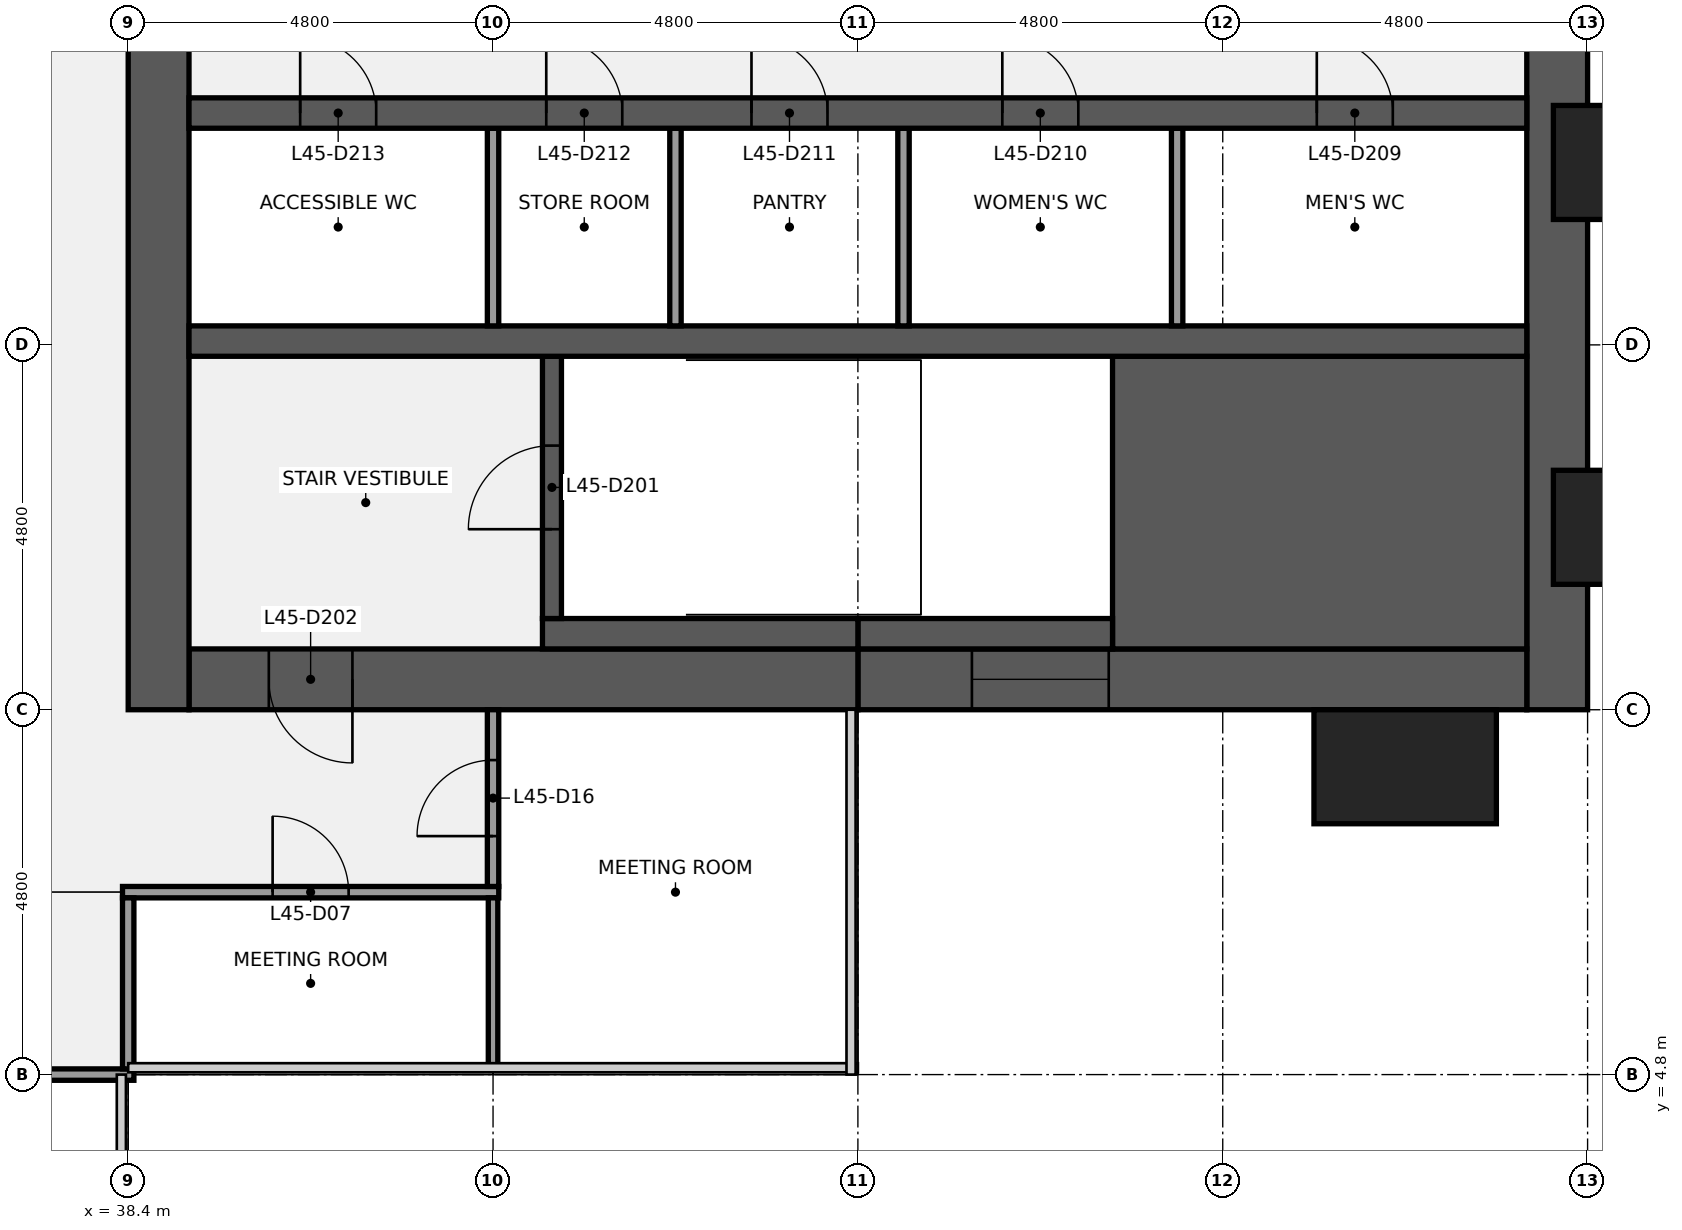
"""IFC4 building model, lengths in metres.
Left out: names, types, materials, properties, quantities, classifications, styles, units other than length and angle.
Written with IfcOpenShell. Run it as: python <this file> out.ifc"""

import sys

from ifc_helpers import new_model, si_unit, direction, frame, frame_2d, origin, origin_2d, place, context, subcontext, project, spatial, rectangle, extrude, element, fill, save


model = new_model("IFC4")
c1 = context("Model", 3, precision=1e-05, world=origin(), true_north=direction((0.0, 1.0)))
c2 = subcontext(c1, "Body", "Model", "MODEL_VIEW")
j1 = project(units=[si_unit("LENGTHUNIT", "METRE"), si_unit("PLANEANGLEUNIT", "RADIAN")], contexts=[c1])
p1 = place(None, origin())
s1 = spatial("IfcSite", under=j1, at=p1, CompositionType="ELEMENT")
p2 = place(p1, origin())
s2 = spatial("IfcBuilding", under=s1, at=p2, CompositionType="ELEMENT")
p3 = place(p2, frame((0.0, 0.0, 209.2)))
s3 = spatial("IfcBuildingStorey", under=s2, at=p3, CompositionType="ELEMENT", Elevation=209.2)
p4 = place(p3, frame((57.2, 38.4, 0.0), z_axis=(0.0, 0.0, 1.0), x_axis=(0.0, -1.0, 0.0)))
e1 = element("IfcWall", 1, at=p4, inside=s3, PredefinedType="SHEAR", context=c2, shape_type="SweptSolid", body=[
    extrude(rectangle(XDim=28.8, YDim=0.8, at=frame_2d((14.4, 0.0))), origin(), (0.0, 0.0, 1.0), 3.84),
])
p5 = place(p4, frame((18.45, 0.0, 0.9)))
e2 = element("IfcOpeningElement", 2, at=p5, cuts=e1, PredefinedType="OPENING", context=c2, shape_type="SweptSolid", body=[
    extrude(rectangle(XDim=1.5, YDim=1.5, at=frame_2d((0.75, 0.75))), frame((0.0, 0.41, 0.0), z_axis=(0.0, -1.0, 0.0), x_axis=(1.0, 0.0, 0.0)), (0.0, 0.0, 1.0), 0.82),
])
p6 = place(p4, frame((8.85, 0.0, 0.9)))
e3 = element("IfcOpeningElement", 3, at=p6, cuts=e1, PredefinedType="OPENING", context=c2, shape_type="SweptSolid", body=[
    extrude(rectangle(XDim=1.5, YDim=1.5, at=frame_2d((0.75, 0.75))), frame((0.0, 0.41, 0.0), z_axis=(0.0, -1.0, 0.0), x_axis=(1.0, 0.0, 0.0)), (0.0, 0.0, 1.0), 0.82),
])
p7 = place(p3, frame((56.8, 10.0, 0.0), z_axis=(0.0, 0.0, 1.0), x_axis=(-1.0, 0.0, 0.0)))
e4 = element("IfcWall", 4, at=p7, inside=s3, PredefinedType="SHEAR", context=c2, shape_type="SweptSolid", body=[
    extrude(rectangle(XDim=8.8, YDim=0.8, at=frame_2d((4.4, 0.0))), origin(), (0.0, 0.0, 1.0), 3.84),
])
p8 = place(p7, frame((5.5, 0.0, 0.9)))
e5 = element("IfcOpeningElement", 5, at=p8, cuts=e4, PredefinedType="OPENING", context=c2, shape_type="SweptSolid", body=[
    extrude(rectangle(XDim=1.8, YDim=1.5, at=frame_2d((0.9, 0.75))), frame((0.0, 0.41, 0.0), z_axis=(0.0, -1.0, 0.0), x_axis=(1.0, 0.0, 0.0)), (0.0, 0.0, 1.0), 0.82),
])
p9 = place(p3, frame((48.0, 10.0, 0.0), z_axis=(0.0, 0.0, 1.0), x_axis=(-1.0, 0.0, 0.0)))
e6 = element("IfcWall", 6, at=p9, inside=s3, PredefinedType="SHEAR", context=c2, shape_type="SweptSolid", body=[
    extrude(rectangle(XDim=8.8, YDim=0.8, at=frame_2d((4.4, 0.0))), origin(), (0.0, 0.0, 1.0), 3.84),
])
p10 = place(p9, frame((6.65, 0.0, 0.0)))
e7 = element("IfcOpeningElement", 7, at=p10, cuts=e6, PredefinedType="OPENING", context=c2, shape_type="SweptSolid", body=[
    extrude(rectangle(XDim=1.1, YDim=2.1, at=frame_2d((0.55, 1.05))), frame((0.0, 0.41, 0.0), z_axis=(0.0, -1.0, 0.0), x_axis=(1.0, 0.0, 0.0)), (0.0, 0.0, 1.0), 0.82),
])
p11 = place(p3, frame((38.8, 9.6, 0.0), z_axis=(0.0, 0.0, 1.0), x_axis=(0.0, 1.0, 0.0)))
e8 = element("IfcWall", 8, at=p11, inside=s3, PredefinedType="SHEAR", context=c2, shape_type="SweptSolid", body=[
    extrude(rectangle(XDim=28.8, YDim=0.8, at=frame_2d((14.4, 0.0))), origin(), (0.0, 0.0, 1.0), 3.84),
])
p12 = place(p11, frame((8.7, 0.0, 0.0)))
e9 = element("IfcOpeningElement", 9, at=p12, cuts=e8, PredefinedType="OPENING", context=c2, shape_type="SweptSolid", body=[
    extrude(rectangle(XDim=1.8, YDim=2.1, at=frame_2d((0.9, 1.05))), frame((0.0, 0.41, 0.0), z_axis=(0.0, -1.0, 0.0), x_axis=(1.0, 0.0, 0.0)), (0.0, 0.0, 1.0), 0.82),
])
p13 = place(p11, frame((18.3, 0.0, 0.0)))
e10 = element("IfcOpeningElement", 10, at=p13, cuts=e8, PredefinedType="OPENING", context=c2, shape_type="SweptSolid", body=[
    extrude(rectangle(XDim=1.8, YDim=2.1, at=frame_2d((0.9, 1.05))), frame((0.0, 0.41, 0.0), z_axis=(0.0, -1.0, 0.0), x_axis=(1.0, 0.0, 0.0)), (0.0, 0.0, 1.0), 0.82),
])
p14 = place(p3, frame((51.35, 12.325, 0.0), z_axis=(0.0, 0.0, 1.0), x_axis=(1.0, 0.0, 0.0)))
e11 = element("IfcWall", 11, at=p14, inside=s3, PredefinedType="SHEAR", context=c2, shape_type="SweptSolid", body=[
    extrude(rectangle(XDim=5.45, YDim=3.85, at=frame_2d((2.725, 0.0))), origin(), (0.0, 0.0, 1.0), 3.84),
])
p15 = place(p3, frame((48.0, 10.6, 0.0), z_axis=(0.0, 0.0, 1.0), x_axis=(1.0, 0.0, 0.0)))
e12 = element("IfcWall", 12, at=p15, inside=s3, PredefinedType="SHEAR", context=c2, shape_type="SweptSolid", body=[
    extrude(rectangle(XDim=3.35, YDim=0.4, at=frame_2d((1.675, 0.0))), origin(), (0.0, 0.0, 1.0), 3.84),
])
p16 = place(p3, frame((43.85, 10.6, 0.0), z_axis=(0.0, 0.0, 1.0), x_axis=(1.0, 0.0, 0.0)))
e13 = element("IfcWall", 13, at=p16, inside=s3, PredefinedType="SHEAR", context=c2, shape_type="SweptSolid", body=[
    extrude(rectangle(XDim=4.15, YDim=0.4, at=frame_2d((2.075, 0.0))), origin(), (0.0, 0.0, 1.0), 3.84),
])
p17 = place(p3, frame((43.975, 10.8, 0.0), z_axis=(0.0, 0.0, 1.0), x_axis=(0.0, 1.0, 0.0)))
e14 = element("IfcWall", 14, at=p17, inside=s3, PredefinedType="SHEAR", context=c2, shape_type="SweptSolid", body=[
    extrude(rectangle(XDim=3.45, YDim=0.25, at=frame_2d((1.725, 0.0))), origin(), (0.0, 0.0, 1.0), 3.84),
])
p18 = place(p17, frame((1.175, 0.0, 0.0)))
e15 = element("IfcOpeningElement", 15, at=p18, cuts=e14, PredefinedType="OPENING", context=c2, shape_type="SweptSolid", body=[
    extrude(rectangle(XDim=1.1, YDim=2.1, at=frame_2d((0.55, 1.05))), frame((0.0, 0.135, 0.0), z_axis=(0.0, -1.0, 0.0), x_axis=(1.0, 0.0, 0.0)), (0.0, 0.0, 1.0), 0.27),
])
p19 = place(p3, frame((39.2, 14.45, 0.0), z_axis=(0.0, 0.0, 1.0), x_axis=(1.0, 0.0, 0.0)))
e16 = element("IfcWall", 16, at=p19, inside=s3, PredefinedType="SHEAR", context=c2, shape_type="SweptSolid", body=[
    extrude(rectangle(XDim=17.6, YDim=0.4, at=frame_2d((8.8, 0.0))), origin(), (0.0, 0.0, 1.0), 3.84),
])
for number, where, z_axis, x_axis in (
    (17, (52.2, 14.65, 0.0), (0.0, 0.0, 1.0), (0.0, 1.0, 0.0)),
    (18, (48.6, 14.65, 0.0), (0.0, 0.0, 1.0), (0.0, 1.0, 0.0)),
    (19, (45.6, 14.65, 0.0), (0.0, 0.0, 1.0), (0.0, 1.0, 0.0)),
    (20, (43.2, 14.65, 0.0), (0.0, 0.0, 1.0), (0.0, 1.0, 0.0)),
):
    element("IfcWall", number, at=place(p3, frame(where, z_axis=z_axis, x_axis=x_axis)), inside=s3, PredefinedType="PARTITIONING", context=c2, shape_type="SweptSolid", body=[
        extrude(rectangle(XDim=2.6, YDim=0.15, at=frame_2d((1.3, 0.0))), origin(), (0.0, 0.0, 1.0), 3.84),
    ])
p20 = place(p3, frame((39.2, 17.45, 0.0), z_axis=(0.0, 0.0, 1.0), x_axis=(1.0, 0.0, 0.0)))
e21 = element("IfcWall", 21, at=p20, inside=s3, PredefinedType="SHEAR", context=c2, shape_type="SweptSolid", body=[
    extrude(rectangle(XDim=17.6, YDim=0.4, at=frame_2d((8.8, 0.0))), origin(), (0.0, 0.0, 1.0), 3.84),
])
p21 = place(p20, frame((14.837, 0.0, 0.0)))
e22 = element("IfcOpeningElement", 22, at=p21, cuts=e21, PredefinedType="OPENING", context=c2, shape_type="SweptSolid", body=[
    extrude(rectangle(XDim=1.0, YDim=2.1, at=frame_2d((0.5, 1.05))), frame((0.0, 0.21, 0.0), z_axis=(0.0, -1.0, 0.0), x_axis=(1.0, 0.0, 0.0)), (0.0, 0.0, 1.0), 0.42),
])
p22 = place(p20, frame((10.7, 0.0, 0.0)))
e23 = element("IfcOpeningElement", 23, at=p22, cuts=e21, PredefinedType="OPENING", context=c2, shape_type="SweptSolid", body=[
    extrude(rectangle(XDim=1.0, YDim=2.1, at=frame_2d((0.5, 1.05))), frame((0.0, 0.21, 0.0), z_axis=(0.0, -1.0, 0.0), x_axis=(1.0, 0.0, 0.0)), (0.0, 0.0, 1.0), 0.42),
])
p23 = place(p20, frame((7.4, 0.0, 0.0)))
e24 = element("IfcOpeningElement", 24, at=p23, cuts=e21, PredefinedType="OPENING", context=c2, shape_type="SweptSolid", body=[
    extrude(rectangle(XDim=1.0, YDim=2.1, at=frame_2d((0.5, 1.05))), frame((0.0, 0.21, 0.0), z_axis=(0.0, -1.0, 0.0), x_axis=(1.0, 0.0, 0.0)), (0.0, 0.0, 1.0), 0.42),
])
p24 = place(p20, frame((4.7, 0.0, 0.0)))
e25 = element("IfcOpeningElement", 25, at=p24, cuts=e21, PredefinedType="OPENING", context=c2, shape_type="SweptSolid", body=[
    extrude(rectangle(XDim=1.0, YDim=2.1, at=frame_2d((0.5, 1.05))), frame((0.0, 0.21, 0.0), z_axis=(0.0, -1.0, 0.0), x_axis=(1.0, 0.0, 0.0)), (0.0, 0.0, 1.0), 0.42),
])
p25 = place(p20, frame((1.462, 0.0, 0.0)))
e26 = element("IfcOpeningElement", 26, at=p25, cuts=e21, PredefinedType="OPENING", context=c2, shape_type="SweptSolid", body=[
    extrude(rectangle(XDim=1.0, YDim=2.1, at=frame_2d((0.5, 1.05))), frame((0.0, 0.21, 0.0), z_axis=(0.0, -1.0, 0.0), x_axis=(1.0, 0.0, 0.0)), (0.0, 0.0, 1.0), 0.42),
])
p26 = place(p3, frame((19.125, 4.8, 0.0), z_axis=(0.0, 0.0, 1.0), x_axis=(1.0, 0.0, 0.0)))
e27 = element("IfcWall", 27, at=p26, inside=s3, PredefinedType="PARTITIONING", context=c2, shape_type="SweptSolid", body=[
    extrude(rectangle(XDim=19.35, YDim=0.15, at=frame_2d((9.675, 0.0))), origin(), (0.0, 0.0, 1.0), 2.87),
])
p27 = place(p26, frame((0.775, 0.0, 0.0)))
e28 = element("IfcOpeningElement", 28, at=p27, cuts=e27, PredefinedType="OPENING", context=c2, shape_type="SweptSolid", body=[
    extrude(rectangle(XDim=1.0, YDim=2.1, at=frame_2d((0.5, 1.05))), frame((0.0, 0.085, 0.0), z_axis=(0.0, -1.0, 0.0), x_axis=(1.0, 0.0, 0.0)), (0.0, 0.0, 1.0), 0.17),
])
p28 = place(p26, frame((4.375, 0.0, 0.0)))
e29 = element("IfcOpeningElement", 29, at=p28, cuts=e27, PredefinedType="OPENING", context=c2, shape_type="SweptSolid", body=[
    extrude(rectangle(XDim=1.0, YDim=2.1, at=frame_2d((0.5, 1.05))), frame((0.0, 0.085, 0.0), z_axis=(0.0, -1.0, 0.0), x_axis=(1.0, 0.0, 0.0)), (0.0, 0.0, 1.0), 0.17),
])
p29 = place(p26, frame((7.975, 0.0, 0.0)))
e30 = element("IfcOpeningElement", 30, at=p29, cuts=e27, PredefinedType="OPENING", context=c2, shape_type="SweptSolid", body=[
    extrude(rectangle(XDim=1.0, YDim=2.1, at=frame_2d((0.5, 1.05))), frame((0.0, 0.085, 0.0), z_axis=(0.0, -1.0, 0.0), x_axis=(1.0, 0.0, 0.0)), (0.0, 0.0, 1.0), 0.17),
])
p30 = place(p26, frame((13.975, 0.0, 0.0)))
e31 = element("IfcOpeningElement", 31, at=p30, cuts=e27, PredefinedType="OPENING", context=c2, shape_type="SweptSolid", body=[
    extrude(rectangle(XDim=1.0, YDim=2.1, at=frame_2d((0.5, 1.05))), frame((0.0, 0.085, 0.0), z_axis=(0.0, -1.0, 0.0), x_axis=(1.0, 0.0, 0.0)), (0.0, 0.0, 1.0), 0.17),
])
p31 = place(p3, frame((38.325, 7.2, 0.0), z_axis=(0.0, 0.0, 1.0), x_axis=(1.0, 0.0, 0.0)))
e32 = element("IfcWall", 32, at=p31, inside=s3, PredefinedType="PARTITIONING", context=c2, shape_type="SweptSolid", body=[
    extrude(rectangle(XDim=4.95, YDim=0.15, at=frame_2d((2.475, 0.0))), origin(), (0.0, 0.0, 1.0), 2.87),
])
p32 = place(p31, frame((1.975, 0.0, 0.0)))
e33 = element("IfcOpeningElement", 33, at=p32, cuts=e32, PredefinedType="OPENING", context=c2, shape_type="SweptSolid", body=[
    extrude(rectangle(XDim=1.0, YDim=2.1, at=frame_2d((0.5, 1.05))), frame((0.0, 0.085, 0.0), z_axis=(0.0, -1.0, 0.0), x_axis=(1.0, 0.0, 0.0)), (0.0, 0.0, 1.0), 0.17),
])
p33 = place(p3, frame((38.4, 4.875, 0.0), z_axis=(0.0, 0.0, 1.0), x_axis=(0.0, 1.0, 0.0)))
e34 = element("IfcWall", 34, at=p33, inside=s3, PredefinedType="PARTITIONING", context=c2, shape_type="SweptSolid", body=[
    extrude(rectangle(XDim=2.25, YDim=0.15, at=frame_2d((1.125, 0.0))), origin(), (0.0, 0.0, 1.0), 2.87),
])
p34 = place(p3, frame((43.2, 4.9, 0.0), z_axis=(0.0, 0.0, 1.0), x_axis=(0.0, 1.0, 0.0)))
e35 = element("IfcWall", 35, at=p34, inside=s3, PredefinedType="PARTITIONING", context=c2, shape_type="SweptSolid", body=[
    extrude(rectangle(XDim=2.225, YDim=0.125, at=frame_2d((1.113, 0.0))), origin(), (0.0, 0.0, 1.0), 2.87),
])
p35 = place(p3, frame((43.2, 7.275, 0.0), z_axis=(0.0, 0.0, 1.0), x_axis=(0.0, 1.0, 0.0)))
e36 = element("IfcWall", 36, at=p35, inside=s3, PredefinedType="PARTITIONING", context=c2, shape_type="SweptSolid", body=[
    extrude(rectangle(XDim=2.325, YDim=0.15, at=frame_2d((1.163, 0.0))), origin(), (0.0, 0.0, 1.0), 2.87),
])
p36 = place(p35, frame((0.663, 0.0, 0.0)))
e37 = element("IfcOpeningElement", 37, at=p36, cuts=e36, PredefinedType="OPENING", context=c2, shape_type="SweptSolid", body=[
    extrude(rectangle(XDim=1.0, YDim=2.1, at=frame_2d((0.5, 1.05))), frame((0.0, 0.085, 0.0), z_axis=(0.0, -1.0, 0.0), x_axis=(1.0, 0.0, 0.0)), (0.0, 0.0, 1.0), 0.17),
])
for number, where, z_axis, x_axis in (
    (38, (55.2, 8.85, 0.0), (0.0, 0.0, 1.0), (1.0, 0.0, 0.0)),
    (39, (58.35, 12.0, 0.0), (0.0, 0.0, 1.0), (0.0, 1.0, 0.0)),
    (40, (58.35, 16.8, 0.0), (0.0, 0.0, 1.0), (0.0, 1.0, 0.0)),
):
    element("IfcColumn", number, at=place(p3, frame(where, z_axis=z_axis, x_axis=x_axis)), inside=s3, PredefinedType="PILASTER", context=c2, shape_type="SweptSolid", body=[
        extrude(rectangle(XDim=2.4, YDim=1.5, at=origin_2d()), origin(), (0.0, 0.0, 1.0), 4.0),
    ])
p37 = place(p18, origin())
e41 = element("IfcDoor", 41, at=p37, inside=s3, OperationType="SINGLE_SWING_LEFT", PredefinedType="DOOR", context=c2, shape_type="SweptSolid", body=[
    extrude(rectangle(XDim=1.1, YDim=2.1, at=frame_2d((0.55, 1.05))), frame((0.0, 0.025, 0.0), z_axis=(0.0, -1.0, 0.0), x_axis=(1.0, 0.0, 0.0)), (0.0, 0.0, 1.0), 0.05),
])
fill(e15, e41)
p38 = place(p10, origin())
e42 = element("IfcDoor", 42, at=p38, inside=s3, OperationType="SINGLE_SWING_LEFT", PredefinedType="DOOR", context=c2, shape_type="SweptSolid", body=[
    extrude(rectangle(XDim=1.1, YDim=2.1, at=frame_2d((0.55, 1.05))), frame((0.0, 0.025, 0.0), z_axis=(0.0, -1.0, 0.0), x_axis=(1.0, 0.0, 0.0)), (0.0, 0.0, 1.0), 0.05),
])
fill(e7, e42)
p39 = place(p21, origin())
e43 = element("IfcDoor", 43, at=p39, inside=s3, OperationType="SINGLE_SWING_LEFT", PredefinedType="DOOR", context=c2, shape_type="SweptSolid", body=[
    extrude(rectangle(XDim=1.0, YDim=2.1, at=frame_2d((0.5, 1.05))), frame((0.0, 0.025, 0.0), z_axis=(0.0, -1.0, 0.0), x_axis=(1.0, 0.0, 0.0)), (0.0, 0.0, 1.0), 0.05),
])
fill(e22, e43)
p40 = place(p22, origin())
e44 = element("IfcDoor", 44, at=p40, inside=s3, OperationType="SINGLE_SWING_LEFT", PredefinedType="DOOR", context=c2, shape_type="SweptSolid", body=[
    extrude(rectangle(XDim=1.0, YDim=2.1, at=frame_2d((0.5, 1.05))), frame((0.0, 0.025, 0.0), z_axis=(0.0, -1.0, 0.0), x_axis=(1.0, 0.0, 0.0)), (0.0, 0.0, 1.0), 0.05),
])
fill(e23, e44)
p41 = place(p23, origin())
e45 = element("IfcDoor", 45, at=p41, inside=s3, OperationType="SINGLE_SWING_LEFT", PredefinedType="DOOR", context=c2, shape_type="SweptSolid", body=[
    extrude(rectangle(XDim=1.0, YDim=2.1, at=frame_2d((0.5, 1.05))), frame((0.0, 0.025, 0.0), z_axis=(0.0, -1.0, 0.0), x_axis=(1.0, 0.0, 0.0)), (0.0, 0.0, 1.0), 0.05),
])
fill(e24, e45)
p42 = place(p24, origin())
e46 = element("IfcDoor", 46, at=p42, inside=s3, OperationType="SINGLE_SWING_LEFT", PredefinedType="DOOR", context=c2, shape_type="SweptSolid", body=[
    extrude(rectangle(XDim=1.0, YDim=2.1, at=frame_2d((0.5, 1.05))), frame((0.0, 0.025, 0.0), z_axis=(0.0, -1.0, 0.0), x_axis=(1.0, 0.0, 0.0)), (0.0, 0.0, 1.0), 0.05),
])
fill(e25, e46)
p43 = place(p25, origin())
e47 = element("IfcDoor", 47, at=p43, inside=s3, OperationType="SINGLE_SWING_LEFT", PredefinedType="DOOR", context=c2, shape_type="SweptSolid", body=[
    extrude(rectangle(XDim=1.0, YDim=2.1, at=frame_2d((0.5, 1.05))), frame((0.0, 0.025, 0.0), z_axis=(0.0, -1.0, 0.0), x_axis=(1.0, 0.0, 0.0)), (0.0, 0.0, 1.0), 0.05),
])
fill(e26, e47)
p44 = place(p8, origin())
e48 = element("IfcWindow", 48, at=p44, inside=s3, PartitioningType="SINGLE_PANEL", PredefinedType="WINDOW", context=c2, shape_type="SweptSolid", body=[
    extrude(rectangle(XDim=1.8, YDim=1.5, at=frame_2d((0.9, 0.75))), frame((0.0, 0.03, 0.0), z_axis=(0.0, -1.0, 0.0), x_axis=(1.0, 0.0, 0.0)), (0.0, 0.0, 1.0), 0.06),
])
fill(e5, e48)
p45 = place(p32, origin())
e49 = element("IfcDoor", 49, at=p45, inside=s3, OperationType="SINGLE_SWING_LEFT", PredefinedType="DOOR", context=c2, shape_type="SweptSolid", body=[
    extrude(rectangle(XDim=1.0, YDim=2.1, at=frame_2d((0.5, 1.05))), frame((0.0, 0.025, 0.0), z_axis=(0.0, -1.0, 0.0), x_axis=(1.0, 0.0, 0.0)), (0.0, 0.0, 1.0), 0.05),
])
fill(e33, e49)
p46 = place(p36, origin())
e50 = element("IfcDoor", 50, at=p46, inside=s3, OperationType="SINGLE_SWING_LEFT", PredefinedType="DOOR", context=c2, shape_type="SweptSolid", body=[
    extrude(rectangle(XDim=1.0, YDim=2.1, at=frame_2d((0.5, 1.05))), frame((0.0, 0.025, 0.0), z_axis=(0.0, -1.0, 0.0), x_axis=(1.0, 0.0, 0.0)), (0.0, 0.0, 1.0), 0.05),
])
fill(e37, e50)
save(model, sys.argv[1])
